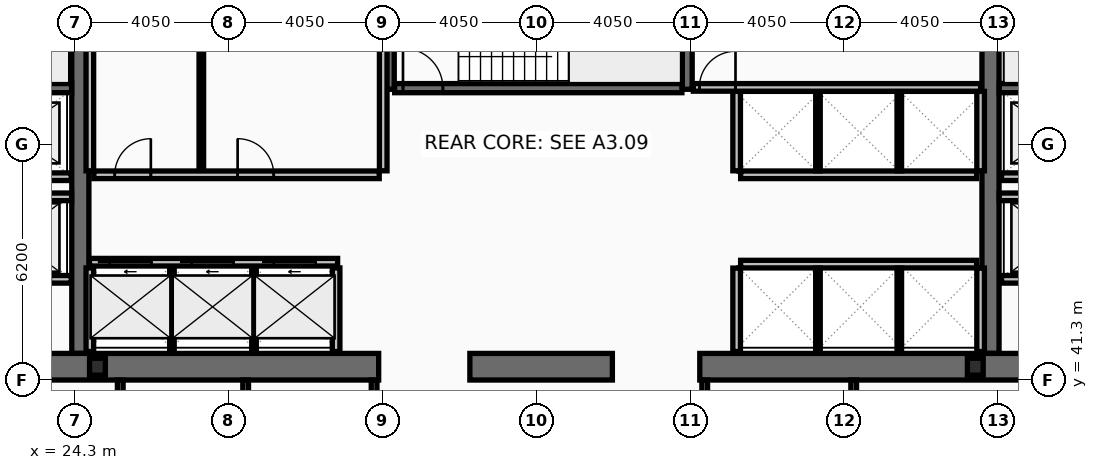
"""IFC4 building model, lengths in metres.
Left out: names, types, materials, properties, quantities, classifications, styles, units other than length and angle.
Written with IfcOpenShell. Run it as: python <this file> out.ifc"""

import sys

from ifc_helpers import new_model, si_unit, direction, frame, frame_2d, origin, origin_2d, place, context, subcontext, project, spatial, rectangle, i_section, extrude, element, fill, save


model = new_model("IFC4")
c1 = context("Model", 3, precision=1e-05, world=origin(), true_north=direction((0.0, 1.0)))
c2 = subcontext(c1, "Body", "Model", "MODEL_VIEW")
j1 = project(units=[si_unit("LENGTHUNIT", "METRE"), si_unit("PLANEANGLEUNIT", "RADIAN")], contexts=[c1])
p1 = place(None, origin())
s1 = spatial("IfcSite", under=j1, at=p1, CompositionType="ELEMENT")
p2 = place(p1, origin())
s2 = spatial("IfcBuilding", under=s1, at=p2, CompositionType="ELEMENT")
p3 = place(p2, frame((0.0, 0.0, 147.0)))
s3 = spatial("IfcBuildingStorey", under=s2, at=p3, CompositionType="ELEMENT", Elevation=147.0)
for number, where, z_axis, x_axis in (
    (1, (24.45, 42.0, 0.0), (0.0, 0.0, 1.0), (0.0, 1.0, 0.0)),
    (2, (48.4, 42.0, 0.0), (0.0, 0.0, 1.0), (0.0, 1.0, 0.0)),
):
    element("IfcWall", number, at=place(p3, frame(where, z_axis=z_axis, x_axis=x_axis)), inside=s3, PredefinedType="SHEAR", context=c2, shape_type="SweptSolid", body=[
        extrude(rectangle(XDim=11.0, YDim=0.45, at=frame_2d((5.5, 0.0))), origin(), (0.0, 0.0, 1.0), 3.44),
    ])
p4 = place(p3, frame((32.3, 41.65, 0.0), z_axis=(0.0, 0.0, 1.0), x_axis=(-1.0, 0.0, 0.0)))
e3 = element("IfcWall", 3, at=p4, inside=s3, PredefinedType="SHEAR", context=c2, shape_type="SweptSolid", body=[
    extrude(rectangle(XDim=11.45, YDim=0.7, at=frame_2d((5.725, 0.0))), origin(), (0.0, 0.0, 1.0), 3.44),
])
p5 = place(p3, frame((38.45, 41.65, 0.0), z_axis=(0.0, 0.0, 1.0), x_axis=(-1.0, 0.0, 0.0)))
e4 = element("IfcWall", 4, at=p5, inside=s3, PredefinedType="SHEAR", context=c2, shape_type="SweptSolid", body=[
    extrude(rectangle(XDim=3.75, YDim=0.7, at=frame_2d((1.875, 0.0))), origin(), (0.0, 0.0, 1.0), 3.44),
])
p6 = place(p3, frame((52.05, 41.65, 0.0), z_axis=(0.0, 0.0, 1.0), x_axis=(-1.0, 0.0, 0.0)))
e5 = element("IfcWall", 5, at=p6, inside=s3, PredefinedType="SHEAR", context=c2, shape_type="SweptSolid", body=[
    extrude(rectangle(XDim=11.3, YDim=0.7, at=frame_2d((5.65, 0.0))), origin(), (0.0, 0.0, 1.0), 3.44),
])
for number, where, z_axis, x_axis in (
    (6, (32.58, 48.95, 0.0), (0.0, 0.0, 1.0), (0.0, 1.0, 0.0)),
    (7, (40.42, 48.95, 0.0), (0.0, 0.0, 1.0), (0.0, 1.0, 0.0)),
):
    element("IfcWall", number, at=place(p3, frame(where, z_axis=z_axis, x_axis=x_axis)), inside=s3, PredefinedType="SHEAR", context=c2, shape_type="SweptSolid", body=[
        extrude(rectangle(XDim=4.05, YDim=0.26, at=frame_2d((2.025, 0.0))), origin(), (0.0, 0.0, 1.0), 3.44),
    ])
p7 = place(p3, frame((16.9, 48.98, 0.0), z_axis=(0.0, 0.0, 1.0), x_axis=(1.0, 0.0, 0.0)))
e8 = element("IfcWall", 8, at=p7, inside=s3, PredefinedType="SHEAR", context=c2, shape_type="SweptSolid", body=[
    extrude(rectangle(XDim=7.32, YDim=0.24, at=frame_2d((3.66, 0.0))), origin(), (0.0, 0.0, 1.0), 3.44),
])
p8 = place(p7, frame((0.22, 0.0, 0.0)))
e9 = element("IfcOpeningElement", 9, at=p8, cuts=e8, PredefinedType="OPENING", context=c2, shape_type="SweptSolid", body=[
    extrude(rectangle(XDim=1.05, YDim=2.15, at=frame_2d((0.525, 1.075))), frame((0.0, 0.13, 0.0), z_axis=(0.0, -1.0, 0.0), x_axis=(1.0, 0.0, 0.0)), (0.0, 0.0, 1.0), 0.26),
])
p9 = place(p3, frame((48.63, 48.98, 0.0), z_axis=(0.0, 0.0, 1.0), x_axis=(1.0, 0.0, 0.0)))
e10 = element("IfcWall", 10, at=p9, inside=s3, PredefinedType="SHEAR", context=c2, shape_type="SweptSolid", body=[
    extrude(rectangle(XDim=7.37, YDim=0.24, at=frame_2d((3.685, 0.0))), origin(), (0.0, 0.0, 1.0), 3.44),
])
p10 = place(p9, frame((6.1, 0.0, 0.0)))
e11 = element("IfcOpeningElement", 11, at=p10, cuts=e10, PredefinedType="OPENING", context=c2, shape_type="SweptSolid", body=[
    extrude(rectangle(XDim=1.05, YDim=2.15, at=frame_2d((0.525, 1.075))), frame((0.0, 0.13, 0.0), z_axis=(0.0, -1.0, 0.0), x_axis=(1.0, 0.0, 0.0)), (0.0, 0.0, 1.0), 0.26),
])
p11 = place(p3, frame((32.72, 48.98, 0.0), z_axis=(0.0, 0.0, 1.0), x_axis=(1.0, 0.0, 0.0)))
e12 = element("IfcWall", 12, at=p11, inside=s3, PredefinedType="SHEAR", context=c2, shape_type="SweptSolid", body=[
    extrude(rectangle(XDim=7.56, YDim=0.24, at=frame_2d((3.78, 0.0))), origin(), (0.0, 0.0, 1.0), 3.44),
])
p12 = place(p11, frame((0.22, 0.0, 0.0)))
e13 = element("IfcOpeningElement", 13, at=p12, cuts=e12, PredefinedType="OPENING", context=c2, shape_type="SweptSolid", body=[
    extrude(rectangle(XDim=1.05, YDim=2.15, at=frame_2d((0.525, 1.075))), frame((0.0, 0.13, 0.0), z_axis=(0.0, -1.0, 0.0), x_axis=(1.0, 0.0, 0.0)), (0.0, 0.0, 1.0), 0.26),
])
for number, where, z_axis, x_axis in (
    (14, (24.9, 41.65, 0.0), (0.0, 0.0, 1.0), (1.0, 0.0, 0.0)),
    (15, (48.0, 41.65, 0.0), (0.0, 0.0, 1.0), (1.0, 0.0, 0.0)),
):
    element("IfcColumn", number, at=place(p3, frame(where, z_axis=z_axis, x_axis=x_axis)), inside=s3, PredefinedType="COLUMN", context=c2, shape_type="SweptSolid", body=[
        extrude(i_section(OverallWidth=0.416, OverallDepth=0.446, WebThickness=0.039, FlangeThickness=0.063, at=origin_2d()), origin(), (0.0, 0.0, 1.0), 3.6),
    ])
p13 = place(p3, frame((24.69, 44.4, 0.0), z_axis=(0.0, 0.0, 1.0), x_axis=(1.0, 0.0, 0.0)))
e16 = element("IfcWall", 16, at=p13, inside=s3, PredefinedType="PARTITIONING", context=c2, shape_type="SweptSolid", body=[
    extrude(rectangle(XDim=6.53, YDim=0.2, at=frame_2d((3.265, 0.0))), origin(), (0.0, 0.0, 1.0), 3.44),
])
p14 = place(p13, frame((0.53, 0.0, 0.0)))
e17 = element("IfcOpeningElement", 17, at=p14, cuts=e16, PredefinedType="OPENING", context=c2, shape_type="SweptSolid", body=[
    extrude(rectangle(XDim=1.1, YDim=2.18, at=frame_2d((0.55, 1.09))), frame((0.0, 0.11, 0.0), z_axis=(0.0, -1.0, 0.0), x_axis=(1.0, 0.0, 0.0)), (0.0, 0.0, 1.0), 0.22),
])
p15 = place(p13, frame((2.69, 0.0, 0.0)))
e18 = element("IfcOpeningElement", 18, at=p15, cuts=e16, PredefinedType="OPENING", context=c2, shape_type="SweptSolid", body=[
    extrude(rectangle(XDim=1.1, YDim=2.18, at=frame_2d((0.55, 1.09))), frame((0.0, 0.11, 0.0), z_axis=(0.0, -1.0, 0.0), x_axis=(1.0, 0.0, 0.0)), (0.0, 0.0, 1.0), 0.22),
])
p16 = place(p13, frame((4.85, 0.0, 0.0)))
e19 = element("IfcOpeningElement", 19, at=p16, cuts=e16, PredefinedType="OPENING", context=c2, shape_type="SweptSolid", body=[
    extrude(rectangle(XDim=1.1, YDim=2.18, at=frame_2d((0.55, 1.09))), frame((0.0, 0.11, 0.0), z_axis=(0.0, -1.0, 0.0), x_axis=(1.0, 0.0, 0.0)), (0.0, 0.0, 1.0), 0.22),
])
p17 = place(p3, frame((51.61, 43.95, 0.0), z_axis=(0.0, 0.0, 1.0), x_axis=(-1.0, 0.0, 0.0)))
e20 = element("IfcWall", 20, at=p17, inside=s3, PredefinedType="PARTITIONING", context=c2, shape_type="SweptSolid", body=[
    extrude(rectangle(XDim=2.92, YDim=0.2, at=frame_2d((1.46, 0.0))), origin(), (0.0, 0.0, 1.0), 3.44),
])
p18 = place(p17, frame((0.81, 0.0, 0.0)))
e21 = element("IfcOpeningElement", 21, at=p18, cuts=e20, PredefinedType="OPENING", context=c2, shape_type="SweptSolid", body=[
    extrude(rectangle(XDim=1.3, YDim=2.18, at=frame_2d((0.65, 1.09))), frame((0.0, 0.11, 0.0), z_axis=(0.0, -1.0, 0.0), x_axis=(1.0, 0.0, 0.0)), (0.0, 0.0, 1.0), 0.22),
])
p19 = place(p3, frame((24.21, 43.95, 0.0), z_axis=(0.0, 0.0, 1.0), x_axis=(-1.0, 0.0, 0.0)))
e22 = element("IfcWall", 22, at=p19, inside=s3, PredefinedType="PARTITIONING", context=c2, shape_type="SweptSolid", body=[
    extrude(rectangle(XDim=2.97, YDim=0.2, at=frame_2d((1.485, 0.0))), origin(), (0.0, 0.0, 1.0), 3.44),
])
p20 = place(p19, frame((0.86, 0.0, 0.0)))
e23 = element("IfcOpeningElement", 23, at=p20, cuts=e22, PredefinedType="OPENING", context=c2, shape_type="SweptSolid", body=[
    extrude(rectangle(XDim=1.3, YDim=2.18, at=frame_2d((0.65, 1.09))), frame((0.0, 0.11, 0.0), z_axis=(0.0, -1.0, 0.0), x_axis=(1.0, 0.0, 0.0)), (0.0, 0.0, 1.0), 0.22),
])
p21 = place(p3, frame((51.61, 46.65, 0.0), z_axis=(0.0, 0.0, 1.0), x_axis=(-1.0, 0.0, 0.0)))
e24 = element("IfcWall", 24, at=p21, inside=s3, PredefinedType="PARTITIONING", context=c2, shape_type="SweptSolid", body=[
    extrude(rectangle(XDim=2.92, YDim=0.2, at=frame_2d((1.46, 0.0))), origin(), (0.0, 0.0, 1.0), 3.44),
])
p22 = place(p21, frame((0.86, 0.0, 0.0)))
e25 = element("IfcOpeningElement", 25, at=p22, cuts=e24, PredefinedType="OPENING", context=c2, shape_type="SweptSolid", body=[
    extrude(rectangle(XDim=1.2, YDim=2.18, at=frame_2d((0.6, 1.09))), frame((0.0, 0.11, 0.0), z_axis=(0.0, -1.0, 0.0), x_axis=(1.0, 0.0, 0.0)), (0.0, 0.0, 1.0), 0.22),
])
p23 = place(p3, frame((24.21, 46.65, 0.0), z_axis=(0.0, 0.0, 1.0), x_axis=(-1.0, 0.0, 0.0)))
e26 = element("IfcWall", 26, at=p23, inside=s3, PredefinedType="PARTITIONING", context=c2, shape_type="SweptSolid", body=[
    extrude(rectangle(XDim=2.97, YDim=0.2, at=frame_2d((1.485, 0.0))), origin(), (0.0, 0.0, 1.0), 3.44),
])
p24 = place(p23, frame((0.91, 0.0, 0.0)))
e27 = element("IfcOpeningElement", 27, at=p24, cuts=e26, PredefinedType="OPENING", context=c2, shape_type="SweptSolid", body=[
    extrude(rectangle(XDim=1.2, YDim=2.18, at=frame_2d((0.6, 1.09))), frame((0.0, 0.11, 0.0), z_axis=(0.0, -1.0, 0.0), x_axis=(1.0, 0.0, 0.0)), (0.0, 0.0, 1.0), 0.22),
])
p25 = place(p3, frame((21.2, 46.12, 0.0), z_axis=(0.0, 0.0, 1.0), x_axis=(1.0, 0.0, 0.0)))
e28 = element("IfcWall", 28, at=p25, inside=s3, PredefinedType="PARTITIONING", context=c2, shape_type="SweptSolid", body=[
    extrude(rectangle(XDim=3.02, YDim=0.2, at=frame_2d((1.51, 0.0))), origin(), (0.0, 0.0, 1.0), 3.44),
])
p26 = place(p3, frame((48.63, 46.12, 0.0), z_axis=(0.0, 0.0, 1.0), x_axis=(1.0, 0.0, 0.0)))
e29 = element("IfcWall", 29, at=p26, inside=s3, PredefinedType="PARTITIONING", context=c2, shape_type="SweptSolid", body=[
    extrude(rectangle(XDim=3.07, YDim=0.2, at=frame_2d((1.535, 0.0))), origin(), (0.0, 0.0, 1.0), 3.44),
])
for number, where, z_axis, x_axis in (
    (30, (24.7, 46.805, 0.0), (0.0, 0.0, 1.0), (0.0, 1.0, 0.0)),
    (31, (32.42, 46.805, 0.0), (0.0, 0.0, 1.0), (0.0, 1.0, 0.0)),
):
    element("IfcWall", number, at=place(p3, frame(where, z_axis=z_axis, x_axis=x_axis)), inside=s3, PredefinedType="PARTITIONING", context=c2, shape_type="SweptSolid", body=[
        extrude(rectangle(XDim=5.99, YDim=0.2, at=frame_2d((2.995, 0.0))), origin(), (0.0, 0.0, 1.0), 3.44),
    ])
p27 = place(p3, frame((27.634, 46.805, 0.0), z_axis=(0.0, 0.0, 1.0), x_axis=(0.0, 1.0, 0.0)))
e32 = element("IfcWall", 32, at=p27, inside=s3, PredefinedType="PARTITIONING", context=c2, shape_type="SweptSolid", body=[
    extrude(rectangle(XDim=5.99, YDim=0.12, at=frame_2d((2.995, 0.0))), origin(), (0.0, 0.0, 1.0), 3.44),
])
p28 = place(p3, frame((24.805, 46.7, 0.0), z_axis=(0.0, 0.0, 1.0), x_axis=(1.0, 0.0, 0.0)))
e33 = element("IfcWall", 33, at=p28, inside=s3, PredefinedType="PARTITIONING", context=c2, shape_type="SweptSolid", body=[
    extrude(rectangle(XDim=7.51, YDim=0.2, at=frame_2d((3.755, 0.0))), origin(), (0.0, 0.0, 1.0), 3.44),
])
p29 = place(p28, frame((0.55, 0.0, 0.0)))
e34 = element("IfcOpeningElement", 34, at=p29, cuts=e33, PredefinedType="OPENING", context=c2, shape_type="SweptSolid", body=[
    extrude(rectangle(XDim=0.95, YDim=2.1, at=frame_2d((0.475, 1.05))), frame((0.0, 0.11, 0.0), z_axis=(0.0, -1.0, 0.0), x_axis=(1.0, 0.0, 0.0)), (0.0, 0.0, 1.0), 0.22),
])
p30 = place(p28, frame((3.784, 0.0, 0.0)))
e35 = element("IfcOpeningElement", 35, at=p30, cuts=e33, PredefinedType="OPENING", context=c2, shape_type="SweptSolid", body=[
    extrude(rectangle(XDim=0.95, YDim=2.1, at=frame_2d((0.475, 1.05))), frame((0.0, 0.11, 0.0), z_axis=(0.0, -1.0, 0.0), x_axis=(1.0, 0.0, 0.0)), (0.0, 0.0, 1.0), 0.22),
])
for number, where, z_axis, x_axis in (
    (36, (24.7, 42.05, 0.0), (0.0, 0.0, 1.0), (0.0, 1.0, 0.0)),
    (37, (31.18, 42.05, 0.0), (0.0, 0.0, 1.0), (0.0, 1.0, 0.0)),
):
    element("IfcWall", number, at=place(p3, frame(where, z_axis=z_axis, x_axis=x_axis)), inside=s3, PredefinedType="PARTITIONING", context=c2, shape_type="SweptSolid", body=[
        extrude(rectangle(XDim=2.2, YDim=0.2, at=frame_2d((1.1, 0.0))), origin(), (0.0, 0.0, 1.0), 3.44),
    ])
for number, where, z_axis, x_axis in (
    (38, (26.86, 42.05, 0.0), (0.0, 0.0, 1.0), (0.0, 1.0, 0.0)),
    (39, (29.02, 42.05, 0.0), (0.0, 0.0, 1.0), (0.0, 1.0, 0.0)),
):
    element("IfcWall", number, at=place(p3, frame(where, z_axis=z_axis, x_axis=x_axis)), inside=s3, PredefinedType="PARTITIONING", context=c2, shape_type="SweptSolid", body=[
        extrude(rectangle(XDim=2.2, YDim=0.12, at=frame_2d((1.1, 0.0))), origin(), (0.0, 0.0, 1.0), 3.44),
    ])
p31 = place(p3, frame((41.825, 46.7, 0.0), z_axis=(0.0, 0.0, 1.0), x_axis=(1.0, 0.0, 0.0)))
e40 = element("IfcWall", 40, at=p31, inside=s3, PredefinedType="PARTITIONING", context=c2, shape_type="SweptSolid", body=[
    extrude(rectangle(XDim=6.21, YDim=0.2, at=frame_2d((3.105, 0.0))), origin(), (0.0, 0.0, 1.0), 3.44),
])
for number, where, z_axis, x_axis in (
    (41, (41.72, 46.805, 0.0), (0.0, 0.0, 1.0), (0.0, 1.0, 0.0)),
    (42, (48.14, 46.805, 0.0), (0.0, 0.0, 1.0), (0.0, 1.0, 0.0)),
):
    element("IfcWall", number, at=place(p3, frame(where, z_axis=z_axis, x_axis=x_axis)), inside=s3, PredefinedType="PARTITIONING", context=c2, shape_type="SweptSolid", body=[
        extrude(rectangle(XDim=2.09, YDim=0.2, at=frame_2d((1.045, 0.0))), origin(), (0.0, 0.0, 1.0), 3.44),
    ])
for number, where, z_axis, x_axis in (
    (43, (43.86, 46.805, 0.0), (0.0, 0.0, 1.0), (0.0, 1.0, 0.0)),
    (44, (46.0, 46.805, 0.0), (0.0, 0.0, 1.0), (0.0, 1.0, 0.0)),
):
    element("IfcWall", number, at=place(p3, frame(where, z_axis=z_axis, x_axis=x_axis)), inside=s3, PredefinedType="PARTITIONING", context=c2, shape_type="SweptSolid", body=[
        extrude(rectangle(XDim=2.09, YDim=0.12, at=frame_2d((1.045, 0.0))), origin(), (0.0, 0.0, 1.0), 3.44),
    ])
p32 = place(p3, frame((41.825, 44.35, 0.0), z_axis=(0.0, 0.0, 1.0), x_axis=(1.0, 0.0, 0.0)))
e45 = element("IfcWall", 45, at=p32, inside=s3, PredefinedType="PARTITIONING", context=c2, shape_type="SweptSolid", body=[
    extrude(rectangle(XDim=6.21, YDim=0.2, at=frame_2d((3.105, 0.0))), origin(), (0.0, 0.0, 1.0), 3.44),
])
for number, where, z_axis, x_axis in (
    (46, (41.72, 42.05, 0.0), (0.0, 0.0, 1.0), (0.0, 1.0, 0.0)),
    (47, (48.14, 42.05, 0.0), (0.0, 0.0, 1.0), (0.0, 1.0, 0.0)),
):
    element("IfcWall", number, at=place(p3, frame(where, z_axis=z_axis, x_axis=x_axis)), inside=s3, PredefinedType="PARTITIONING", context=c2, shape_type="SweptSolid", body=[
        extrude(rectangle(XDim=2.195, YDim=0.2, at=frame_2d((1.098, 0.0))), origin(), (0.0, 0.0, 1.0), 3.44),
    ])
for number, where, z_axis, x_axis in (
    (48, (43.86, 42.05, 0.0), (0.0, 0.0, 1.0), (0.0, 1.0, 0.0)),
    (49, (46.0, 42.05, 0.0), (0.0, 0.0, 1.0), (0.0, 1.0, 0.0)),
):
    element("IfcWall", number, at=place(p3, frame(where, z_axis=z_axis, x_axis=x_axis)), inside=s3, PredefinedType="PARTITIONING", context=c2, shape_type="SweptSolid", body=[
        extrude(rectangle(XDim=2.195, YDim=0.12, at=frame_2d((1.098, 0.0))), origin(), (0.0, 0.0, 1.0), 3.44),
    ])
p33 = place(p3, frame((40.58, 49.0, 0.0), z_axis=(0.0, 0.0, 1.0), x_axis=(1.0, 0.0, 0.0)))
e50 = element("IfcWall", 50, at=p33, inside=s3, PredefinedType="PARTITIONING", context=c2, shape_type="SweptSolid", body=[
    extrude(rectangle(XDim=7.56, YDim=0.2, at=frame_2d((3.78, 0.0))), origin(), (0.0, 0.0, 1.0), 3.44),
])
p34 = place(p33, frame((0.16, 0.0, 0.0)))
e51 = element("IfcOpeningElement", 51, at=p34, cuts=e50, PredefinedType="OPENING", context=c2, shape_type="SweptSolid", body=[
    extrude(rectangle(XDim=0.95, YDim=2.1, at=frame_2d((0.475, 1.05))), frame((0.0, 0.11, 0.0), z_axis=(0.0, -1.0, 0.0), x_axis=(1.0, 0.0, 0.0)), (0.0, 0.0, 1.0), 0.22),
])
for number, where, z_axis, x_axis in (
    (52, (25.5, 38.28, 0.0), (0.0, 0.0, 1.0), (0.0, 1.0, 0.0)),
    (53, (28.8, 38.28, 0.0), (0.0, 0.0, 1.0), (0.0, 1.0, 0.0)),
    (54, (32.18, 38.28, 0.0), (0.0, 0.0, 1.0), (0.0, 1.0, 0.0)),
    (55, (40.88, 38.28, 0.0), (0.0, 0.0, 1.0), (0.0, 1.0, 0.0)),
    (56, (44.8, 38.28, 0.0), (0.0, 0.0, 1.0), (0.0, 1.0, 0.0)),
):
    element("IfcWall", number, at=place(p3, frame(where, z_axis=z_axis, x_axis=x_axis)), inside=s3, PredefinedType="PARTITIONING", context=c2, shape_type="SweptSolid", body=[
        extrude(rectangle(XDim=3.02, YDim=0.15, at=frame_2d((1.51, 0.0))), origin(), (0.0, 0.0, 1.0), 3.44),
    ])
p35 = place(p12, origin())
e57 = element("IfcDoor", 57, at=p35, inside=s3, OperationType="SINGLE_SWING_LEFT", PredefinedType="DOOR", context=c2, shape_type="SweptSolid", body=[
    extrude(rectangle(XDim=1.05, YDim=2.15, at=frame_2d((0.525, 1.075))), frame((0.0, 0.025, 0.0), z_axis=(0.0, -1.0, 0.0), x_axis=(1.0, 0.0, 0.0)), (0.0, 0.0, 1.0), 0.05),
])
fill(e13, e57)
p36 = place(p14, origin())
e58 = element("IfcDoor", 58, at=p36, inside=s3, OperationType="SLIDING_TO_LEFT", PredefinedType="DOOR", context=c2, shape_type="SweptSolid", body=[
    extrude(rectangle(XDim=1.1, YDim=2.18, at=frame_2d((0.55, 1.09))), frame((0.0, 0.025, 0.0), z_axis=(0.0, -1.0, 0.0), x_axis=(1.0, 0.0, 0.0)), (0.0, 0.0, 1.0), 0.05),
])
fill(e17, e58)
p37 = place(p15, origin())
e59 = element("IfcDoor", 59, at=p37, inside=s3, OperationType="SLIDING_TO_LEFT", PredefinedType="DOOR", context=c2, shape_type="SweptSolid", body=[
    extrude(rectangle(XDim=1.1, YDim=2.18, at=frame_2d((0.55, 1.09))), frame((0.0, 0.025, 0.0), z_axis=(0.0, -1.0, 0.0), x_axis=(1.0, 0.0, 0.0)), (0.0, 0.0, 1.0), 0.05),
])
fill(e18, e59)
p38 = place(p16, origin())
e60 = element("IfcDoor", 60, at=p38, inside=s3, OperationType="SLIDING_TO_LEFT", PredefinedType="DOOR", context=c2, shape_type="SweptSolid", body=[
    extrude(rectangle(XDim=1.1, YDim=2.18, at=frame_2d((0.55, 1.09))), frame((0.0, 0.025, 0.0), z_axis=(0.0, -1.0, 0.0), x_axis=(1.0, 0.0, 0.0)), (0.0, 0.0, 1.0), 0.05),
])
fill(e19, e60)
p39 = place(p29, origin())
e61 = element("IfcDoor", 61, at=p39, inside=s3, OperationType="SINGLE_SWING_RIGHT", PredefinedType="DOOR", context=c2, shape_type="SweptSolid", body=[
    extrude(rectangle(XDim=0.95, YDim=2.1, at=frame_2d((0.475, 1.05))), frame((0.0, 0.025, 0.0), z_axis=(0.0, -1.0, 0.0), x_axis=(1.0, 0.0, 0.0)), (0.0, 0.0, 1.0), 0.05),
])
fill(e34, e61)
p40 = place(p30, origin())
e62 = element("IfcDoor", 62, at=p40, inside=s3, OperationType="SINGLE_SWING_LEFT", PredefinedType="DOOR", context=c2, shape_type="SweptSolid", body=[
    extrude(rectangle(XDim=0.95, YDim=2.1, at=frame_2d((0.475, 1.05))), frame((0.0, 0.025, 0.0), z_axis=(0.0, -1.0, 0.0), x_axis=(1.0, 0.0, 0.0)), (0.0, 0.0, 1.0), 0.05),
])
fill(e35, e62)
p41 = place(p34, origin())
e63 = element("IfcDoor", 63, at=p41, inside=s3, OperationType="SINGLE_SWING_RIGHT", PredefinedType="DOOR", context=c2, shape_type="SweptSolid", body=[
    extrude(rectangle(XDim=0.95, YDim=2.1, at=frame_2d((0.475, 1.05))), frame((0.0, 0.025, 0.0), z_axis=(0.0, -1.0, 0.0), x_axis=(1.0, 0.0, 0.0)), (0.0, 0.0, 1.0), 0.05),
])
fill(e51, e63)
save(model, sys.argv[1])
